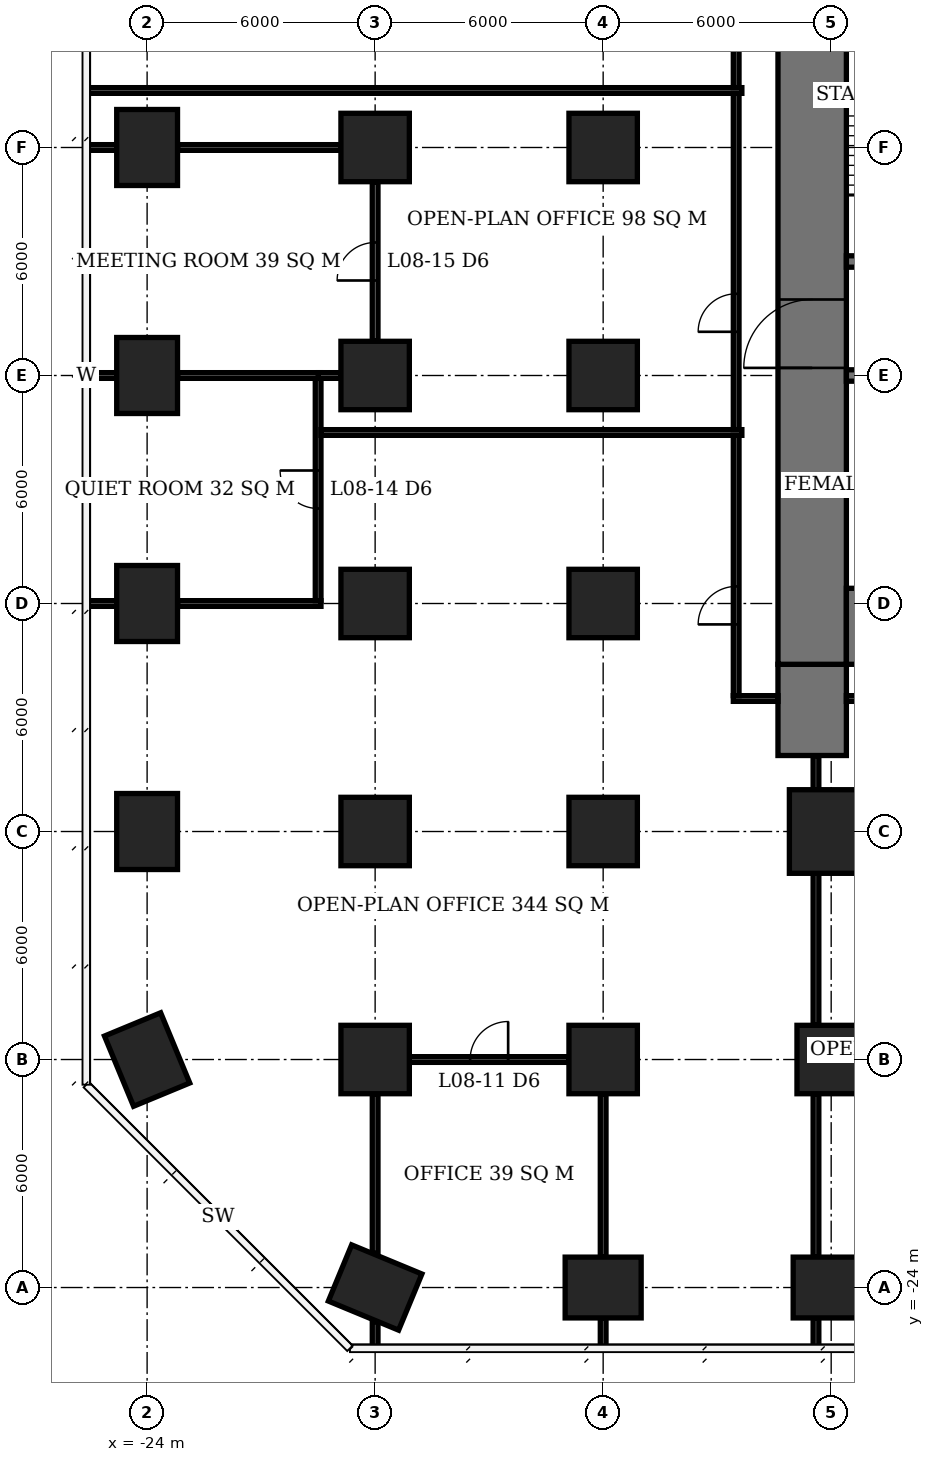
"""IFC4 building model, lengths in metres.
Left out: names, types, materials, properties, quantities, classifications, styles, units other than length and angle.
Written with IfcOpenShell. Run it as: python <this file> out.ifc"""

import sys

from ifc_helpers import new_model, si_unit, direction, frame, frame_2d, origin, origin_2d, place, context, subcontext, project, spatial, rectangle, extrude, element, fill, save


model = new_model("IFC4")
c1 = context("Model", 3, precision=1e-05, world=origin(), true_north=direction((0.0, 1.0)))
c2 = subcontext(c1, "Body", "Model", "MODEL_VIEW")
j1 = project(units=[si_unit("LENGTHUNIT", "METRE"), si_unit("PLANEANGLEUNIT", "RADIAN")], contexts=[c1])
p1 = place(None, origin())
s1 = spatial("IfcSite", under=j1, at=p1, CompositionType="ELEMENT")
p2 = place(p1, origin())
s2 = spatial("IfcBuilding", under=s1, at=p2, CompositionType="ELEMENT")
p3 = place(p2, frame((0.0, 0.0, 37.7)))
s3 = spatial("IfcBuildingStorey", under=s2, at=p3, CompositionType="ELEMENT", Elevation=37.7)
for number, where, z_axis, x_axis in (
    (1, (-24.0, -18.0, 0.0), (0.0, 0.0, 1.0), (-0.383, 0.924, 0.0)),
    (2, (-24.0, -12.0, 0.0), (0.0, 0.0, 1.0), (0.0, 1.0, 0.0)),
    (3, (-24.0, -6.0, 0.0), (0.0, 0.0, 1.0), (0.0, 1.0, 0.0)),
    (4, (-24.0, 0.0, 0.0), (0.0, 0.0, 1.0), (0.0, 1.0, 0.0)),
    (5, (-24.0, 6.0, 0.0), (0.0, 0.0, 1.0), (0.0, 1.0, 0.0)),
    (6, (-18.0, -24.0, 0.0), (0.0, 0.0, 1.0), (-0.924, 0.383, 0.0)),
):
    element("IfcColumn", number, at=place(p3, frame(where, z_axis=z_axis, x_axis=x_axis)), inside=s3, PredefinedType="COLUMN", context=c2, shape_type="SweptSolid", body=[
        extrude(rectangle(XDim=2.0, YDim=1.6, at=origin_2d()), origin(), (0.0, 0.0, 1.0), 3.9),
    ])
for number, where, z_axis, x_axis in (
    (7, (-18.0, -18.0, 0.0), (0.0, 0.0, 1.0), (1.0, 0.0, 0.0)),
    (8, (-18.0, -12.0, 0.0), (0.0, 0.0, 1.0), (1.0, 0.0, 0.0)),
    (9, (-18.0, -6.0, 0.0), (0.0, 0.0, 1.0), (1.0, 0.0, 0.0)),
    (10, (-18.0, 0.0, 0.0), (0.0, 0.0, 1.0), (1.0, 0.0, 0.0)),
    (11, (-18.0, 6.0, 0.0), (0.0, 0.0, 1.0), (1.0, 0.0, 0.0)),
):
    element("IfcColumn", number, at=place(p3, frame(where, z_axis=z_axis, x_axis=x_axis)), inside=s3, PredefinedType="COLUMN", context=c2, shape_type="SweptSolid", body=[
        extrude(rectangle(XDim=1.8, YDim=1.8, at=origin_2d()), origin(), (0.0, 0.0, 1.0), 3.9),
    ])
p4 = place(p3, frame((-12.0, -24.0, 0.0), z_axis=(0.0, 0.0, 1.0), x_axis=(1.0, 0.0, 0.0)))
e12 = element("IfcColumn", 12, at=p4, inside=s3, PredefinedType="COLUMN", context=c2, shape_type="SweptSolid", body=[
    extrude(rectangle(XDim=2.0, YDim=1.6, at=origin_2d()), origin(), (0.0, 0.0, 1.0), 3.9),
])
for number, where, z_axis, x_axis in (
    (13, (-12.0, -18.0, 0.0), (0.0, 0.0, 1.0), (1.0, 0.0, 0.0)),
    (14, (-12.0, -12.0, 0.0), (0.0, 0.0, 1.0), (1.0, 0.0, 0.0)),
    (15, (-12.0, -6.0, 0.0), (0.0, 0.0, 1.0), (1.0, 0.0, 0.0)),
    (16, (-12.0, 0.0, 0.0), (0.0, 0.0, 1.0), (1.0, 0.0, 0.0)),
    (17, (-12.0, 6.0, 0.0), (0.0, 0.0, 1.0), (1.0, 0.0, 0.0)),
):
    element("IfcColumn", number, at=place(p3, frame(where, z_axis=z_axis, x_axis=x_axis)), inside=s3, PredefinedType="COLUMN", context=c2, shape_type="SweptSolid", body=[
        extrude(rectangle(XDim=1.8, YDim=1.8, at=origin_2d()), origin(), (0.0, 0.0, 1.0), 3.9),
    ])
p5 = place(p3, frame((-6.0, -24.0, 0.0), z_axis=(0.0, 0.0, 1.0), x_axis=(1.0, 0.0, 0.0)))
e18 = element("IfcColumn", 18, at=p5, inside=s3, PredefinedType="COLUMN", context=c2, shape_type="SweptSolid", body=[
    extrude(rectangle(XDim=2.0, YDim=1.6, at=origin_2d()), origin(), (0.0, 0.0, 1.0), 3.9),
])
p6 = place(p3, frame((-6.0, -18.0, 0.0), z_axis=(0.0, 0.0, 1.0), x_axis=(1.0, 0.0, 0.0)))
e19 = element("IfcColumn", 19, at=p6, inside=s3, PredefinedType="COLUMN", context=c2, shape_type="SweptSolid", body=[
    extrude(rectangle(XDim=1.8, YDim=1.8, at=origin_2d()), origin(), (0.0, 0.0, 1.0), 3.9),
])
p7 = place(p3, frame((-6.0, -12.0, 0.0), z_axis=(0.0, 0.0, 1.0), x_axis=(1.0, 0.0, 0.0)))
e20 = element("IfcColumn", 20, at=p7, inside=s3, PredefinedType="COLUMN", context=c2, shape_type="SweptSolid", body=[
    extrude(rectangle(XDim=2.2, YDim=2.2, at=origin_2d()), origin(), (0.0, 0.0, 1.0), 3.9),
])
p8 = place(p3, frame((-5.6, -6.6, 0.0), z_axis=(0.0, 0.0, 1.0), x_axis=(1.0, 0.0, 0.0)))
e21 = element("IfcWall", 21, at=p8, inside=s3, PredefinedType="SHEAR", context=c2, shape_type="SweptSolid", body=[
    extrude(rectangle(XDim=23.2, YDim=2.0, at=frame_2d((11.6, 0.0))), origin(), (0.0, 0.0, 1.0), 3.9),
])
p9 = place(p3, frame((-6.5, -7.6, 0.0), z_axis=(0.0, 0.0, 1.0), x_axis=(0.0, 1.0, 0.0)))
e22 = element("IfcWall", 22, at=p9, inside=s3, PredefinedType="SHEAR", context=c2, shape_type="SweptSolid", body=[
    extrude(rectangle(XDim=21.2, YDim=1.8, at=frame_2d((10.6, 0.0))), origin(), (0.0, 0.0, 1.0), 3.9),
])
p10 = place(p9, frame((7.8, 0.0, 0.0)))
e23 = element("IfcOpeningElement", 23, at=p10, cuts=e22, PredefinedType="OPENING", context=c2, shape_type="SweptSolid", body=[
    extrude(rectangle(XDim=1.8, YDim=2.4, at=frame_2d((0.9, 1.2))), frame((0.0, 0.91, 0.0), z_axis=(0.0, -1.0, 0.0), x_axis=(1.0, 0.0, 0.0)), (0.0, 0.0, 1.0), 1.82),
])
p11 = place(p3, frame((-6.5, -10.0, 0.0), z_axis=(0.0, 0.0, 1.0), x_axis=(0.0, 1.0, 0.0)))
e24 = element("IfcWall", 24, at=p11, inside=s3, PredefinedType="SHEAR", context=c2, shape_type="SweptSolid", body=[
    extrude(rectangle(XDim=2.4, YDim=1.8, at=frame_2d((1.2, 0.0))), origin(), (0.0, 0.0, 1.0), 3.9),
])
p12 = place(p3, frame((-5.6, 0.0, 0.0), z_axis=(0.0, 0.0, 1.0), x_axis=(1.0, 0.0, 0.0)))
e25 = element("IfcWall", 25, at=p12, inside=s3, PredefinedType="SHEAR", context=c2, shape_type="SweptSolid", body=[
    extrude(rectangle(XDim=17.75, YDim=0.3, at=frame_2d((8.875, 0.0))), origin(), (0.0, 0.0, 1.0), 3.9),
])
p13 = place(p12, frame((0.6, 0.0, 0.0)))
e26 = element("IfcOpeningElement", 26, at=p13, cuts=e25, PredefinedType="OPENING", context=c2, shape_type="SweptSolid", body=[
    extrude(rectangle(XDim=0.9, YDim=2.1, at=frame_2d((0.45, 1.05))), frame((0.0, 0.16, 0.0), z_axis=(0.0, -1.0, 0.0), x_axis=(1.0, 0.0, 0.0)), (0.0, 0.0, 1.0), 0.32),
])
p14 = place(p12, frame((3.7, 0.0, 0.0)))
e27 = element("IfcOpeningElement", 27, at=p14, cuts=e25, PredefinedType="OPENING", context=c2, shape_type="SweptSolid", body=[
    extrude(rectangle(XDim=1.0, YDim=2.1, at=frame_2d((0.5, 1.05))), frame((0.0, 0.16, 0.0), z_axis=(0.0, -1.0, 0.0), x_axis=(1.0, 0.0, 0.0)), (0.0, 0.0, 1.0), 0.32),
])
p15 = place(p3, frame((-5.6, 3.0, 0.0), z_axis=(0.0, 0.0, 1.0), x_axis=(1.0, 0.0, 0.0)))
e28 = element("IfcWall", 28, at=p15, inside=s3, PredefinedType="SHEAR", context=c2, shape_type="SweptSolid", body=[
    extrude(rectangle(XDim=5.45, YDim=0.3, at=frame_2d((2.725, 0.0))), origin(), (0.0, 0.0, 1.0), 3.9),
])
p16 = place(p15, frame((0.4, 0.0, 0.0)))
e29 = element("IfcOpeningElement", 29, at=p16, cuts=e28, PredefinedType="OPENING", context=c2, shape_type="SweptSolid", body=[
    extrude(rectangle(XDim=1.2, YDim=2.1, at=frame_2d((0.6, 1.05))), frame((0.0, 0.16, 0.0), z_axis=(0.0, -1.0, 0.0), x_axis=(1.0, 0.0, 0.0)), (0.0, 0.0, 1.0), 0.32),
])
p17 = place(p15, frame((3.95, 0.0, 0.0)))
e30 = element("IfcOpeningElement", 30, at=p17, cuts=e28, PredefinedType="OPENING", context=c2, shape_type="SweptSolid", body=[
    extrude(rectangle(XDim=0.9, YDim=2.1, at=frame_2d((0.45, 1.05))), frame((0.0, 0.16, 0.0), z_axis=(0.0, -1.0, 0.0), x_axis=(1.0, 0.0, 0.0)), (0.0, 0.0, 1.0), 0.32),
])
p18 = place(p3, frame((-17.1, -18.0, 0.0), z_axis=(0.0, 0.0, 1.0), x_axis=(1.0, 0.0, 0.0)))
e31 = element("IfcWall", 31, at=p18, inside=s3, PredefinedType="PARTITIONING", context=c2, shape_type="SweptSolid", body=[
    extrude(rectangle(XDim=4.2, YDim=0.15, at=frame_2d((2.1, 0.0))), origin(), (0.0, 0.0, 1.0), 3.65),
])
p19 = place(p18, frame((1.6, 0.0, 0.0)))
e32 = element("IfcOpeningElement", 32, at=p19, cuts=e31, PredefinedType="OPENING", context=c2, shape_type="SweptSolid", body=[
    extrude(rectangle(XDim=1.0, YDim=2.1, at=frame_2d((0.5, 1.05))), frame((0.0, 0.085, 0.0), z_axis=(0.0, -1.0, 0.0), x_axis=(1.0, 0.0, 0.0)), (0.0, 0.0, 1.0), 0.17),
])
p20 = place(p3, frame((-25.6, -6.0, 0.0), z_axis=(0.0, 0.0, 1.0), x_axis=(1.0, 0.0, 0.0)))
e33 = element("IfcWall", 33, at=p20, inside=s3, PredefinedType="PARTITIONING", context=c2, shape_type="SweptSolid", body=[
    extrude(rectangle(XDim=0.8, YDim=0.15, at=frame_2d((0.4, 0.0))), origin(), (0.0, 0.0, 1.0), 3.65),
])
p21 = place(p3, frame((-23.2, -6.0, 0.0), z_axis=(0.0, 0.0, 1.0), x_axis=(1.0, 0.0, 0.0)))
e34 = element("IfcWall", 34, at=p21, inside=s3, PredefinedType="PARTITIONING", context=c2, shape_type="SweptSolid", body=[
    extrude(rectangle(XDim=3.775, YDim=0.15, at=frame_2d((1.887, 0.0))), origin(), (0.0, 0.0, 1.0), 3.65),
])
p22 = place(p3, frame((-25.55, 0.0, 0.0), z_axis=(0.0, 0.0, 1.0), x_axis=(1.0, 0.0, 0.0)))
e35 = element("IfcWall", 35, at=p22, inside=s3, PredefinedType="PARTITIONING", context=c2, shape_type="SweptSolid", body=[
    extrude(rectangle(XDim=0.75, YDim=0.15, at=frame_2d((0.375, 0.0))), origin(), (0.0, 0.0, 1.0), 3.65),
])
p23 = place(p3, frame((-23.2, 0.0, 0.0), z_axis=(0.0, 0.0, 1.0), x_axis=(1.0, 0.0, 0.0)))
e36 = element("IfcWall", 36, at=p23, inside=s3, PredefinedType="PARTITIONING", context=c2, shape_type="SweptSolid", body=[
    extrude(rectangle(XDim=3.775, YDim=0.15, at=frame_2d((1.887, 0.0))), origin(), (0.0, 0.0, 1.0), 3.65),
])
p24 = place(p3, frame((-19.5, 0.0, 0.0), z_axis=(0.0, 0.0, 1.0), x_axis=(1.0, 0.0, 0.0)))
e37 = element("IfcWall", 37, at=p24, inside=s3, PredefinedType="PARTITIONING", context=c2, shape_type="SweptSolid", body=[
    extrude(rectangle(XDim=0.6, YDim=0.15, at=frame_2d((0.3, 0.0))), origin(), (0.0, 0.0, 1.0), 3.65),
])
p25 = place(p3, frame((-25.6, 6.0, 0.0), z_axis=(0.0, 0.0, 1.0), x_axis=(1.0, 0.0, 0.0)))
e38 = element("IfcWall", 38, at=p25, inside=s3, PredefinedType="PARTITIONING", context=c2, shape_type="SweptSolid", body=[
    extrude(rectangle(XDim=0.8, YDim=0.15, at=frame_2d((0.4, 0.0))), origin(), (0.0, 0.0, 1.0), 3.65),
])
p26 = place(p3, frame((-23.2, 6.0, 0.0), z_axis=(0.0, 0.0, 1.0), x_axis=(1.0, 0.0, 0.0)))
e39 = element("IfcWall", 39, at=p26, inside=s3, PredefinedType="PARTITIONING", context=c2, shape_type="SweptSolid", body=[
    extrude(rectangle(XDim=4.3, YDim=0.15, at=frame_2d((2.15, 0.0))), origin(), (0.0, 0.0, 1.0), 3.65),
])
p27 = place(p3, frame((-19.5, -5.925, 0.0), z_axis=(0.0, 0.0, 1.0), x_axis=(0.0, 1.0, 0.0)))
e40 = element("IfcWall", 40, at=p27, inside=s3, PredefinedType="PARTITIONING", context=c2, shape_type="SweptSolid", body=[
    extrude(rectangle(XDim=5.85, YDim=0.15, at=frame_2d((2.925, 0.0))), origin(), (0.0, 0.0, 1.0), 3.65),
])
p28 = place(p27, frame((2.425, 0.0, 0.0)))
e41 = element("IfcOpeningElement", 41, at=p28, cuts=e40, PredefinedType="OPENING", context=c2, shape_type="SweptSolid", body=[
    extrude(rectangle(XDim=1.0, YDim=2.1, at=frame_2d((0.5, 1.05))), frame((0.0, 0.085, 0.0), z_axis=(0.0, -1.0, 0.0), x_axis=(1.0, 0.0, 0.0)), (0.0, 0.0, 1.0), 0.17),
])
p29 = place(p3, frame((-18.0, -25.6, 0.0), z_axis=(0.0, 0.0, 1.0), x_axis=(0.0, 1.0, 0.0)))
e42 = element("IfcWall", 42, at=p29, inside=s3, PredefinedType="PARTITIONING", context=c2, shape_type="SweptSolid", body=[
    extrude(rectangle(XDim=0.703, YDim=0.15, at=frame_2d((0.352, 0.0))), origin(), (0.0, 0.0, 1.0), 3.65),
])
p30 = place(p3, frame((-18.0, -23.103, 0.0), z_axis=(0.0, 0.0, 1.0), x_axis=(0.0, 1.0, 0.0)))
e43 = element("IfcWall", 43, at=p30, inside=s3, PredefinedType="PARTITIONING", context=c2, shape_type="SweptSolid", body=[
    extrude(rectangle(XDim=4.203, YDim=0.15, at=frame_2d((2.102, 0.0))), origin(), (0.0, 0.0, 1.0), 3.65),
])
p31 = place(p3, frame((-18.0, 0.9, 0.0), z_axis=(0.0, 0.0, 1.0), x_axis=(0.0, 1.0, 0.0)))
e44 = element("IfcWall", 44, at=p31, inside=s3, PredefinedType="PARTITIONING", context=c2, shape_type="SweptSolid", body=[
    extrude(rectangle(XDim=4.2, YDim=0.15, at=frame_2d((2.1, 0.0))), origin(), (0.0, 0.0, 1.0), 3.65),
])
p32 = place(p31, frame((1.6, 0.0, 0.0)))
e45 = element("IfcOpeningElement", 45, at=p32, cuts=e44, PredefinedType="OPENING", context=c2, shape_type="SweptSolid", body=[
    extrude(rectangle(XDim=1.0, YDim=2.1, at=frame_2d((0.5, 1.05))), frame((0.0, 0.085, 0.0), z_axis=(0.0, -1.0, 0.0), x_axis=(1.0, 0.0, 0.0)), (0.0, 0.0, 1.0), 0.17),
])
p33 = place(p3, frame((-12.0, -25.6, 0.0), z_axis=(0.0, 0.0, 1.0), x_axis=(0.0, 1.0, 0.0)))
e46 = element("IfcWall", 46, at=p33, inside=s3, PredefinedType="PARTITIONING", context=c2, shape_type="SweptSolid", body=[
    extrude(rectangle(XDim=0.8, YDim=0.15, at=frame_2d((0.4, 0.0))), origin(), (0.0, 0.0, 1.0), 3.65),
])
p34 = place(p3, frame((-12.0, -23.2, 0.0), z_axis=(0.0, 0.0, 1.0), x_axis=(0.0, 1.0, 0.0)))
e47 = element("IfcWall", 47, at=p34, inside=s3, PredefinedType="PARTITIONING", context=c2, shape_type="SweptSolid", body=[
    extrude(rectangle(XDim=4.3, YDim=0.15, at=frame_2d((2.15, 0.0))), origin(), (0.0, 0.0, 1.0), 3.65),
])
p35 = place(p3, frame((-25.6, 7.5, 0.0), z_axis=(0.0, 0.0, 1.0), x_axis=(1.0, 0.0, 0.0)))
e48 = element("IfcWall", 48, at=p35, inside=s3, PredefinedType="PARTITIONING", context=c2, shape_type="SweptSolid", body=[
    extrude(rectangle(XDim=17.25, YDim=0.15, at=frame_2d((8.625, 0.0))), origin(), (0.0, 0.0, 1.0), 3.65),
])
p36 = place(p3, frame((-19.425, -1.5, 0.0), z_axis=(0.0, 0.0, 1.0), x_axis=(1.0, 0.0, 0.0)))
e49 = element("IfcWall", 49, at=p36, inside=s3, PredefinedType="PARTITIONING", context=c2, shape_type="SweptSolid", body=[
    extrude(rectangle(XDim=11.075, YDim=0.15, at=frame_2d((5.538, 0.0))), origin(), (0.0, 0.0, 1.0), 3.65),
])
p37 = place(p3, frame((-8.5, -8.425, 0.0), z_axis=(0.0, 0.0, 1.0), x_axis=(0.0, 1.0, 0.0)))
e50 = element("IfcWall", 50, at=p37, inside=s3, PredefinedType="PARTITIONING", context=c2, shape_type="SweptSolid", body=[
    extrude(rectangle(XDim=6.85, YDim=0.15, at=frame_2d((3.425, 0.0))), origin(), (0.0, 0.0, 1.0), 3.65),
])
p38 = place(p37, frame((1.875, 0.0, 0.0)))
e51 = element("IfcOpeningElement", 51, at=p38, cuts=e50, PredefinedType="OPENING", context=c2, shape_type="SweptSolid", body=[
    extrude(rectangle(XDim=1.0, YDim=2.1, at=frame_2d((0.5, 1.05))), frame((0.0, 0.085, 0.0), z_axis=(0.0, -1.0, 0.0), x_axis=(1.0, 0.0, 0.0)), (0.0, 0.0, 1.0), 0.17),
])
p39 = place(p3, frame((-8.575, -8.5, 0.0), z_axis=(0.0, 0.0, 1.0), x_axis=(1.0, 0.0, 0.0)))
e52 = element("IfcWall", 52, at=p39, inside=s3, PredefinedType="PARTITIONING", context=c2, shape_type="SweptSolid", body=[
    extrude(rectangle(XDim=1.175, YDim=0.15, at=frame_2d((0.587, 0.0))), origin(), (0.0, 0.0, 1.0), 3.65),
])
p40 = place(p3, frame((-8.5, -1.425, 0.0), z_axis=(0.0, 0.0, 1.0), x_axis=(0.0, 1.0, 0.0)))
e53 = element("IfcWall", 53, at=p40, inside=s3, PredefinedType="PARTITIONING", context=c2, shape_type="SweptSolid", body=[
    extrude(rectangle(XDim=8.85, YDim=0.15, at=frame_2d((4.425, 0.0))), origin(), (0.0, 0.0, 1.0), 3.65),
])
p41 = place(p40, frame((2.575, 0.0, 0.0)))
e54 = element("IfcOpeningElement", 54, at=p41, cuts=e53, PredefinedType="OPENING", context=c2, shape_type="SweptSolid", body=[
    extrude(rectangle(XDim=1.0, YDim=2.1, at=frame_2d((0.5, 1.05))), frame((0.0, 0.085, 0.0), z_axis=(0.0, -1.0, 0.0), x_axis=(1.0, 0.0, 0.0)), (0.0, 0.0, 1.0), 0.17),
])
p42 = place(p3, frame((-8.5, 7.575, 0.0), z_axis=(0.0, 0.0, 1.0), x_axis=(0.0, 1.0, 0.0)))
e55 = element("IfcWall", 55, at=p42, inside=s3, PredefinedType="PARTITIONING", context=c2, shape_type="SweptSolid", body=[
    extrude(rectangle(XDim=6.85, YDim=0.15, at=frame_2d((3.425, 0.0))), origin(), (0.0, 0.0, 1.0), 3.65),
])
p43 = place(p42, frame((1.875, 0.0, 0.0)))
e56 = element("IfcOpeningElement", 56, at=p43, cuts=e55, PredefinedType="OPENING", context=c2, shape_type="SweptSolid", body=[
    extrude(rectangle(XDim=1.0, YDim=2.1, at=frame_2d((0.5, 1.05))), frame((0.0, 0.085, 0.0), z_axis=(0.0, -1.0, 0.0), x_axis=(1.0, 0.0, 0.0)), (0.0, 0.0, 1.0), 0.17),
])
p44 = place(p3, frame((-6.4, -25.6, 0.0), z_axis=(0.0, 0.0, 1.0), x_axis=(0.0, 1.0, 0.0)))
e57 = element("IfcWall", 57, at=p44, inside=s3, PredefinedType="PARTITIONING", context=c2, shape_type="SweptSolid", body=[
    extrude(rectangle(XDim=0.8, YDim=0.15, at=frame_2d((0.4, 0.0))), origin(), (0.0, 0.0, 1.0), 3.65),
])
p45 = place(p3, frame((-6.4, -23.2, 0.0), z_axis=(0.0, 0.0, 1.0), x_axis=(0.0, 1.0, 0.0)))
e58 = element("IfcWall", 58, at=p45, inside=s3, PredefinedType="PARTITIONING", context=c2, shape_type="SweptSolid", body=[
    extrude(rectangle(XDim=4.3, YDim=0.15, at=frame_2d((2.15, 0.0))), origin(), (0.0, 0.0, 1.0), 3.65),
])
p46 = place(p3, frame((-6.4, -17.1, 0.0), z_axis=(0.0, 0.0, 1.0), x_axis=(0.0, 1.0, 0.0)))
e59 = element("IfcWall", 59, at=p46, inside=s3, PredefinedType="PARTITIONING", context=c2, shape_type="SweptSolid", body=[
    extrude(rectangle(XDim=4.0, YDim=0.15, at=frame_2d((2.0, 0.0))), origin(), (0.0, 0.0, 1.0), 3.65),
])
p47 = place(p3, frame((-6.4, -10.9, 0.0), z_axis=(0.0, 0.0, 1.0), x_axis=(0.0, 1.0, 0.0)))
e60 = element("IfcWall", 60, at=p47, inside=s3, PredefinedType="PARTITIONING", context=c2, shape_type="SweptSolid", body=[
    extrude(rectangle(XDim=0.9, YDim=0.15, at=frame_2d((0.45, 0.0))), origin(), (0.0, 0.0, 1.0), 3.65),
])
p48 = place(p3, frame((1.425, -8.5, 0.0), z_axis=(0.0, 0.0, 1.0), x_axis=(-1.0, 0.0, 0.0)))
e61 = element("IfcWall", 61, at=p48, inside=s3, PredefinedType="PARTITIONING", context=c2, shape_type="SweptSolid", body=[
    extrude(rectangle(XDim=7.025, YDim=0.15, at=frame_2d((3.513, 0.0))), origin(), (0.0, 0.0, 1.0), 3.65),
])
p49 = place(p48, frame((4.04, 0.0, 0.0)))
e62 = element("IfcOpeningElement", 62, at=p49, cuts=e61, PredefinedType="OPENING", context=c2, shape_type="SweptSolid", body=[
    extrude(rectangle(XDim=1.0, YDim=2.1, at=frame_2d((0.5, 1.05))), frame((0.0, 0.085, 0.0), z_axis=(0.0, -1.0, 0.0), x_axis=(1.0, 0.0, 0.0)), (0.0, 0.0, 1.0), 0.17),
])
p50 = place(p10, origin())
e63 = element("IfcDoor", 63, at=p50, inside=s3, OperationType="DOUBLE_DOOR_SINGLE_SWING", PredefinedType="DOOR", context=c2, shape_type="SweptSolid", body=[
    extrude(rectangle(XDim=1.8, YDim=2.4, at=frame_2d((0.9, 1.2))), frame((0.0, 0.025, 0.0), z_axis=(0.0, -1.0, 0.0), x_axis=(1.0, 0.0, 0.0)), (0.0, 0.0, 1.0), 0.05),
])
fill(e23, e63)
p51 = place(p19, origin())
e64 = element("IfcDoor", 64, at=p51, inside=s3, OperationType="SINGLE_SWING_RIGHT", PredefinedType="DOOR", context=c2, shape_type="SweptSolid", body=[
    extrude(rectangle(XDim=1.0, YDim=2.1, at=frame_2d((0.5, 1.05))), frame((0.0, 0.025, 0.0), z_axis=(0.0, -1.0, 0.0), x_axis=(1.0, 0.0, 0.0)), (0.0, 0.0, 1.0), 0.05),
])
fill(e32, e64)
p52 = place(p28, origin())
e65 = element("IfcDoor", 65, at=p52, inside=s3, OperationType="SINGLE_SWING_RIGHT", PredefinedType="DOOR", context=c2, shape_type="SweptSolid", body=[
    extrude(rectangle(XDim=1.0, YDim=2.1, at=frame_2d((0.5, 1.05))), frame((0.0, 0.025, 0.0), z_axis=(0.0, -1.0, 0.0), x_axis=(1.0, 0.0, 0.0)), (0.0, 0.0, 1.0), 0.05),
])
fill(e41, e65)
p53 = place(p32, origin())
e66 = element("IfcDoor", 66, at=p53, inside=s3, OperationType="SINGLE_SWING_LEFT", PredefinedType="DOOR", context=c2, shape_type="SweptSolid", body=[
    extrude(rectangle(XDim=1.0, YDim=2.1, at=frame_2d((0.5, 1.05))), frame((0.0, 0.025, 0.0), z_axis=(0.0, -1.0, 0.0), x_axis=(1.0, 0.0, 0.0)), (0.0, 0.0, 1.0), 0.05),
])
fill(e45, e66)
p54 = place(p38, origin())
e67 = element("IfcDoor", 67, at=p54, inside=s3, OperationType="SINGLE_SWING_LEFT", PredefinedType="DOOR", context=c2, shape_type="SweptSolid", body=[
    extrude(rectangle(XDim=1.0, YDim=2.1, at=frame_2d((0.5, 1.05))), frame((0.0, 0.025, 0.0), z_axis=(0.0, -1.0, 0.0), x_axis=(1.0, 0.0, 0.0)), (0.0, 0.0, 1.0), 0.05),
])
fill(e51, e67)
p55 = place(p41, origin())
e68 = element("IfcDoor", 68, at=p55, inside=s3, OperationType="SINGLE_SWING_LEFT", PredefinedType="DOOR", context=c2, shape_type="SweptSolid", body=[
    extrude(rectangle(XDim=1.0, YDim=2.1, at=frame_2d((0.5, 1.05))), frame((0.0, 0.025, 0.0), z_axis=(0.0, -1.0, 0.0), x_axis=(1.0, 0.0, 0.0)), (0.0, 0.0, 1.0), 0.05),
])
fill(e54, e68)
save(model, sys.argv[1])
